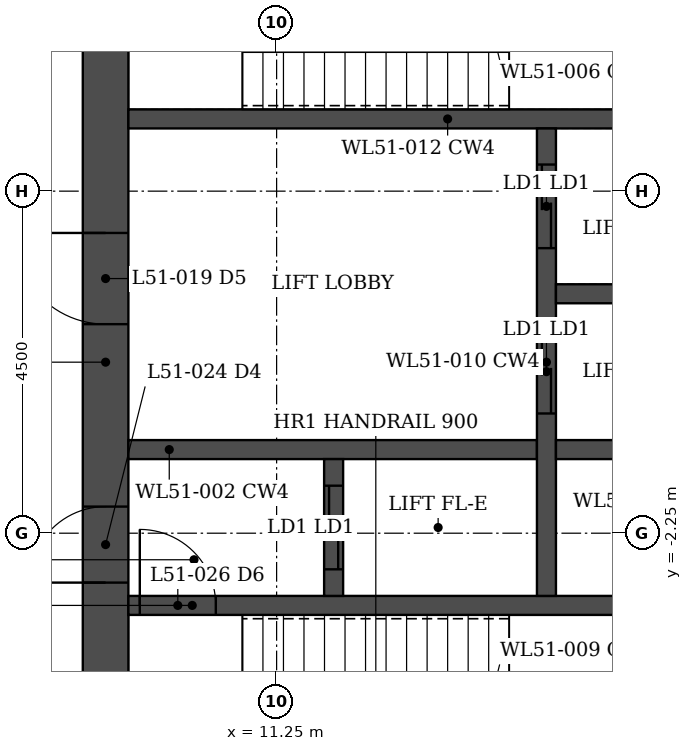
"""IFC4 building model, lengths in metres.
Left out: names, types, materials, properties, quantities, classifications, styles, units other than length and angle.
Written with IfcOpenShell. Run it as: python <this file> out.ifc"""

import sys

from ifc_helpers import new_model, si_unit, direction, frame, frame_2d, origin, place, context, subcontext, project, spatial, rectangle, extrude, element, fill, save


model = new_model("IFC4")
c1 = context("Model", 3, precision=1e-05, world=origin(), true_north=direction((0.0, 1.0)))
c2 = subcontext(c1, "Body", "Model", "MODEL_VIEW")
j1 = project(units=[si_unit("LENGTHUNIT", "METRE"), si_unit("PLANEANGLEUNIT", "RADIAN")], contexts=[c1])
p1 = place(None, origin())
s1 = spatial("IfcSite", under=j1, at=p1, CompositionType="ELEMENT")
p2 = place(p1, origin())
s2 = spatial("IfcBuilding", under=s1, at=p2, CompositionType="ELEMENT")
p3 = place(p2, frame((0.0, 0.0, 195.8)))
s3 = spatial("IfcBuildingStorey", under=s2, at=p3, CompositionType="ELEMENT", Elevation=195.8)
p4 = place(p3, frame((9.0, -6.45, 0.0), z_axis=(0.0, 0.0, 1.0), x_axis=(0.0, 1.0, 0.0)))
e1 = element("IfcWall", 1, at=p4, inside=s3, PredefinedType="SHEAR", context=c2, shape_type="SweptSolid", body=[
    extrude(rectangle(XDim=12.9, YDim=0.6, at=frame_2d((6.45, 0.0))), origin(), (0.0, 0.0, 1.0), 5.0),
])
p5 = place(p4, frame((3.55, 0.0, 0.0)))
e2 = element("IfcOpeningElement", 2, at=p5, cuts=e1, PredefinedType="OPENING", context=c2, shape_type="SweptSolid", body=[
    extrude(rectangle(XDim=1.0, YDim=2.1, at=frame_2d((0.5, 1.05))), frame((0.0, 0.31, 0.0), z_axis=(0.0, -1.0, 0.0), x_axis=(1.0, 0.0, 0.0)), (0.0, 0.0, 1.0), 0.62),
])
p6 = place(p4, frame((6.95, 0.0, 0.0)))
e3 = element("IfcOpeningElement", 3, at=p6, cuts=e1, PredefinedType="OPENING", context=c2, shape_type="SweptSolid", body=[
    extrude(rectangle(XDim=1.2, YDim=2.1, at=frame_2d((0.6, 1.05))), frame((0.0, 0.31, 0.0), z_axis=(0.0, -1.0, 0.0), x_axis=(1.0, 0.0, 0.0)), (0.0, 0.0, 1.0), 0.62),
])
p7 = place(p4, frame((10.85, 0.0, 0.0)))
e4 = element("IfcOpeningElement", 4, at=p7, cuts=e1, PredefinedType="OPENING", context=c2, shape_type="SweptSolid", body=[
    extrude(rectangle(XDim=1.0, YDim=2.1, at=frame_2d((0.5, 1.05))), frame((0.0, 0.31, 0.0), z_axis=(0.0, -1.0, 0.0), x_axis=(1.0, 0.0, 0.0)), (0.0, 0.0, 1.0), 0.62),
])
p8 = place(p3, frame((9.3, -3.2, 0.0), z_axis=(0.0, 0.0, 1.0), x_axis=(1.0, 0.0, 0.0)))
e5 = element("IfcWall", 5, at=p8, inside=s3, PredefinedType="SHEAR", context=c2, shape_type="SweptSolid", body=[
    extrude(rectangle(XDim=8.4, YDim=0.25, at=frame_2d((4.2, 0.0))), origin(), (0.0, 0.0, 1.0), 5.0),
])
p9 = place(p8, frame((0.15, 0.0, 0.0)))
e6 = element("IfcOpeningElement", 6, at=p9, cuts=e5, PredefinedType="OPENING", context=c2, shape_type="SweptSolid", body=[
    extrude(rectangle(XDim=1.0, YDim=2.1, at=frame_2d((0.5, 1.05))), frame((0.0, 0.135, 0.0), z_axis=(0.0, -1.0, 0.0), x_axis=(1.0, 0.0, 0.0)), (0.0, 0.0, 1.0), 0.27),
])
p10 = place(p3, frame((9.3, 3.2, 0.0), z_axis=(0.0, 0.0, 1.0), x_axis=(1.0, 0.0, 0.0)))
e7 = element("IfcWall", 7, at=p10, inside=s3, PredefinedType="SHEAR", context=c2, shape_type="SweptSolid", body=[
    extrude(rectangle(XDim=8.4, YDim=0.25, at=frame_2d((4.2, 0.0))), origin(), (0.0, 0.0, 1.0), 5.0),
])
p11 = place(p3, frame((9.3, -1.15, 0.0), z_axis=(0.0, 0.0, 1.0), x_axis=(1.0, 0.0, 0.0)))
e8 = element("IfcWall", 8, at=p11, inside=s3, PredefinedType="SHEAR", context=c2, shape_type="SweptSolid", body=[
    extrude(rectangle(XDim=5.375, YDim=0.25, at=frame_2d((2.688, 0.0))), origin(), (0.0, 0.0, 1.0), 5.0),
])
p12 = place(p3, frame((12.0, -3.075, 0.0), z_axis=(0.0, 0.0, 1.0), x_axis=(0.0, 1.0, 0.0)))
e9 = element("IfcWall", 9, at=p12, inside=s3, PredefinedType="SHEAR", context=c2, shape_type="SweptSolid", body=[
    extrude(rectangle(XDim=1.8, YDim=0.25, at=frame_2d((0.9, 0.0))), origin(), (0.0, 0.0, 1.0), 5.0),
])
p13 = place(p12, frame((0.35, 0.0, 0.0)))
e10 = element("IfcOpeningElement", 10, at=p13, cuts=e9, PredefinedType="OPENING", context=c2, shape_type="SweptSolid", body=[
    extrude(rectangle(XDim=1.1, YDim=2.1, at=frame_2d((0.55, 1.05))), frame((0.0, 0.135, 0.0), z_axis=(0.0, -1.0, 0.0), x_axis=(1.0, 0.0, 0.0)), (0.0, 0.0, 1.0), 0.27),
])
p14 = place(p3, frame((14.8, -3.075, 0.0), z_axis=(0.0, 0.0, 1.0), x_axis=(0.0, 1.0, 0.0)))
e11 = element("IfcWall", 11, at=p14, inside=s3, PredefinedType="SHEAR", context=c2, shape_type="SweptSolid", body=[
    extrude(rectangle(XDim=6.15, YDim=0.25, at=frame_2d((3.075, 0.0))), origin(), (0.0, 0.0, 1.0), 5.0),
])
p15 = place(p14, frame((2.4, 0.0, 0.0)))
e12 = element("IfcOpeningElement", 12, at=p15, cuts=e11, PredefinedType="OPENING", context=c2, shape_type="SweptSolid", body=[
    extrude(rectangle(XDim=1.1, YDim=2.1, at=frame_2d((0.55, 1.05))), frame((0.0, 0.135, 0.0), z_axis=(0.0, -1.0, 0.0), x_axis=(1.0, 0.0, 0.0)), (0.0, 0.0, 1.0), 0.27),
])
p16 = place(p14, frame((4.575, 0.0, 0.0)))
e13 = element("IfcOpeningElement", 13, at=p16, cuts=e11, PredefinedType="OPENING", context=c2, shape_type="SweptSolid", body=[
    extrude(rectangle(XDim=1.1, YDim=2.1, at=frame_2d((0.55, 1.05))), frame((0.0, 0.135, 0.0), z_axis=(0.0, -1.0, 0.0), x_axis=(1.0, 0.0, 0.0)), (0.0, 0.0, 1.0), 0.27),
])
for number, where, z_axis, x_axis in (
    (14, (14.925, -1.15, 0.0), (0.0, 0.0, 1.0), (1.0, 0.0, 0.0)),
    (15, (14.925, 0.9, 0.0), (0.0, 0.0, 1.0), (1.0, 0.0, 0.0)),
):
    element("IfcWall", number, at=place(p3, frame(where, z_axis=z_axis, x_axis=x_axis)), inside=s3, PredefinedType="SHEAR", context=c2, shape_type="SweptSolid", body=[
        extrude(rectangle(XDim=2.775, YDim=0.25, at=frame_2d((1.387, 0.0))), origin(), (0.0, 0.0, 1.0), 5.0),
    ])
p17 = place(p5, origin())
e16 = element("IfcDoor", 16, at=p17, inside=s3, OperationType="SINGLE_SWING_LEFT", PredefinedType="DOOR", context=c2, shape_type="SweptSolid", body=[
    extrude(rectangle(XDim=1.0, YDim=2.1, at=frame_2d((0.5, 1.05))), frame((0.0, 0.025, 0.0), z_axis=(0.0, -1.0, 0.0), x_axis=(1.0, 0.0, 0.0)), (0.0, 0.0, 1.0), 0.05),
])
fill(e2, e16)
p18 = place(p9, origin())
e17 = element("IfcDoor", 17, at=p18, inside=s3, OperationType="SINGLE_SWING_LEFT", PredefinedType="DOOR", context=c2, shape_type="SweptSolid", body=[
    extrude(rectangle(XDim=1.0, YDim=2.1, at=frame_2d((0.5, 1.05))), frame((0.0, 0.025, 0.0), z_axis=(0.0, -1.0, 0.0), x_axis=(1.0, 0.0, 0.0)), (0.0, 0.0, 1.0), 0.05),
])
fill(e6, e17)
p19 = place(p6, origin())
e18 = element("IfcDoor", 18, at=p19, inside=s3, OperationType="SINGLE_SWING_RIGHT", PredefinedType="DOOR", context=c2, shape_type="SweptSolid", body=[
    extrude(rectangle(XDim=1.2, YDim=2.1, at=frame_2d((0.6, 1.05))), frame((0.0, 0.025, 0.0), z_axis=(0.0, -1.0, 0.0), x_axis=(1.0, 0.0, 0.0)), (0.0, 0.0, 1.0), 0.05),
])
fill(e3, e18)
p20 = place(p13, origin())
e19 = element("IfcDoor", 19, at=p20, inside=s3, OperationType="DOUBLE_DOOR_SLIDING", PredefinedType="DOOR", context=c2, shape_type="SweptSolid", body=[
    extrude(rectangle(XDim=1.1, YDim=2.1, at=frame_2d((0.55, 1.05))), frame((0.0, 0.025, 0.0), z_axis=(0.0, -1.0, 0.0), x_axis=(1.0, 0.0, 0.0)), (0.0, 0.0, 1.0), 0.05),
])
fill(e10, e19)
p21 = place(p15, origin())
e20 = element("IfcDoor", 20, at=p21, inside=s3, OperationType="DOUBLE_DOOR_SLIDING", PredefinedType="DOOR", context=c2, shape_type="SweptSolid", body=[
    extrude(rectangle(XDim=1.1, YDim=2.1, at=frame_2d((0.55, 1.05))), frame((0.0, 0.025, 0.0), z_axis=(0.0, -1.0, 0.0), x_axis=(1.0, 0.0, 0.0)), (0.0, 0.0, 1.0), 0.05),
])
fill(e12, e20)
p22 = place(p16, origin())
e21 = element("IfcDoor", 21, at=p22, inside=s3, OperationType="DOUBLE_DOOR_SLIDING", PredefinedType="DOOR", context=c2, shape_type="SweptSolid", body=[
    extrude(rectangle(XDim=1.1, YDim=2.1, at=frame_2d((0.55, 1.05))), frame((0.0, 0.025, 0.0), z_axis=(0.0, -1.0, 0.0), x_axis=(1.0, 0.0, 0.0)), (0.0, 0.0, 1.0), 0.05),
])
fill(e13, e21)
save(model, sys.argv[1])
